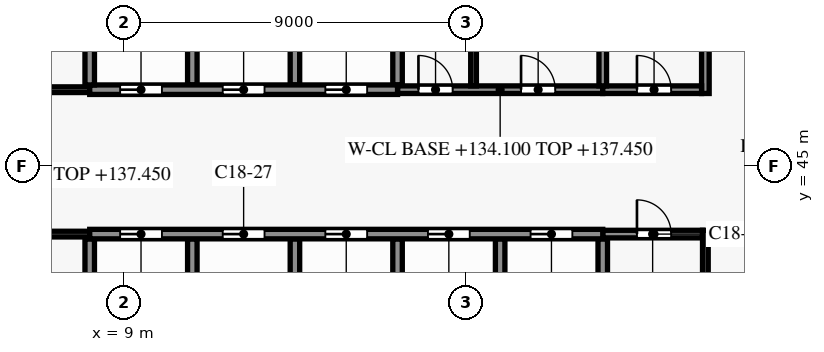
"""IFC4 building model, lengths in metres.
Left out: names, types, materials, properties, quantities, classifications, styles, units other than length and angle.
Written with IfcOpenShell. Run it as: python <this file> out.ifc"""

import sys

from ifc_helpers import new_model, si_unit, direction, frame, frame_2d, origin, place, context, subcontext, project, spatial, rectangle, extrude, element, fill, save


model = new_model("IFC4")
c1 = context("Model", 3, precision=1e-05, world=origin(), true_north=direction((0.0, 1.0)))
c2 = subcontext(c1, "Body", "Model", "MODEL_VIEW")
j1 = project(units=[si_unit("LENGTHUNIT", "METRE"), si_unit("PLANEANGLEUNIT", "RADIAN")], contexts=[c1])
p1 = place(None, origin())
s1 = spatial("IfcSite", under=j1, at=p1, CompositionType="ELEMENT")
p2 = place(p1, origin())
s2 = spatial("IfcBuilding", under=s1, at=p2, CompositionType="ELEMENT")
p3 = place(p2, frame((0.0, 0.0, 134.1)))
s3 = spatial("IfcBuildingStorey", under=s2, at=p3, CompositionType="ELEMENT", Elevation=134.1)
p4 = place(p3, frame((21.6, 43.2, 0.0), z_axis=(0.0, 0.0, 1.0), x_axis=(1.0, 0.0, 0.0)))
e1 = element("IfcWall", 1, at=p4, inside=s3, PredefinedType="PARTITIONING", context=c2, shape_type="SweptSolid", body=[
    extrude(rectangle(XDim=2.625, YDim=0.2, at=frame_2d((1.312, 0.0))), origin(), (0.0, 0.0, 1.0), 3.35),
])
p5 = place(p4, frame((0.9, 0.0, 0.0)))
e2 = element("IfcOpeningElement", 2, at=p5, cuts=e1, PredefinedType="OPENING", context=c2, shape_type="SweptSolid", body=[
    extrude(rectangle(XDim=0.9, YDim=2.1, at=frame_2d((0.45, 1.05))), frame((0.0, 0.11, 0.0), z_axis=(0.0, -1.0, 0.0), x_axis=(1.0, 0.0, 0.0)), (0.0, 0.0, 1.0), 0.22),
])
p6 = place(p3, frame((0.15, 43.2, 0.0), z_axis=(0.0, 0.0, 1.0), x_axis=(1.0, 0.0, 0.0)))
e3 = element("IfcWall", 3, at=p6, inside=s3, PredefinedType="PARTITIONING", context=c2, shape_type="SweptSolid", body=[
    extrude(rectangle(XDim=7.95, YDim=0.15, at=frame_2d((3.975, 0.0))), origin(), (0.0, 0.0, 1.0), 3.35),
])
p7 = place(p6, frame((0.725, 0.0, 0.0)))
e4 = element("IfcOpeningElement", 4, at=p7, cuts=e3, PredefinedType="OPENING", context=c2, shape_type="SweptSolid", body=[
    extrude(rectangle(XDim=0.9, YDim=2.1, at=frame_2d((0.45, 1.05))), frame((0.0, 0.085, 0.0), z_axis=(0.0, -1.0, 0.0), x_axis=(1.0, 0.0, 0.0)), (0.0, 0.0, 1.0), 0.17),
])
p8 = place(p6, frame((4.45, 0.0, 0.0)))
e5 = element("IfcOpeningElement", 5, at=p8, cuts=e3, PredefinedType="OPENING", context=c2, shape_type="SweptSolid", body=[
    extrude(rectangle(XDim=0.9, YDim=2.1, at=frame_2d((0.45, 1.05))), frame((0.0, 0.085, 0.0), z_axis=(0.0, -1.0, 0.0), x_axis=(1.0, 0.0, 0.0)), (0.0, 0.0, 1.0), 0.17),
])
p9 = place(p3, frame((8.1, 43.2, 0.0), z_axis=(0.0, 0.0, 1.0), x_axis=(1.0, 0.0, 0.0)))
e6 = element("IfcWall", 6, at=p9, inside=s3, PredefinedType="SHEAR", context=c2, shape_type="SweptSolid", body=[
    extrude(rectangle(XDim=13.5, YDim=0.25, at=frame_2d((6.75, 0.0))), origin(), (0.0, 0.0, 1.0), 3.5),
])
p10 = place(p9, frame((0.8, 0.0, 0.0)))
e7 = element("IfcOpeningElement", 7, at=p10, cuts=e6, PredefinedType="OPENING", context=c2, shape_type="SweptSolid", body=[
    extrude(rectangle(XDim=1.1, YDim=2.1, at=frame_2d((0.55, 1.05))), frame((0.0, 0.135, 0.0), z_axis=(0.0, -1.0, 0.0), x_axis=(1.0, 0.0, 0.0)), (0.0, 0.0, 1.0), 0.27),
])
p11 = place(p9, frame((3.5, 0.0, 0.0)))
e8 = element("IfcOpeningElement", 8, at=p11, cuts=e6, PredefinedType="OPENING", context=c2, shape_type="SweptSolid", body=[
    extrude(rectangle(XDim=1.1, YDim=2.1, at=frame_2d((0.55, 1.05))), frame((0.0, 0.135, 0.0), z_axis=(0.0, -1.0, 0.0), x_axis=(1.0, 0.0, 0.0)), (0.0, 0.0, 1.0), 0.27),
])
p12 = place(p9, frame((6.2, 0.0, 0.0)))
e9 = element("IfcOpeningElement", 9, at=p12, cuts=e6, PredefinedType="OPENING", context=c2, shape_type="SweptSolid", body=[
    extrude(rectangle(XDim=1.1, YDim=2.1, at=frame_2d((0.55, 1.05))), frame((0.0, 0.135, 0.0), z_axis=(0.0, -1.0, 0.0), x_axis=(1.0, 0.0, 0.0)), (0.0, 0.0, 1.0), 0.27),
])
p13 = place(p9, frame((8.9, 0.0, 0.0)))
e10 = element("IfcOpeningElement", 10, at=p13, cuts=e6, PredefinedType="OPENING", context=c2, shape_type="SweptSolid", body=[
    extrude(rectangle(XDim=1.1, YDim=2.1, at=frame_2d((0.55, 1.05))), frame((0.0, 0.135, 0.0), z_axis=(0.0, -1.0, 0.0), x_axis=(1.0, 0.0, 0.0)), (0.0, 0.0, 1.0), 0.27),
])
p14 = place(p9, frame((11.6, 0.0, 0.0)))
e11 = element("IfcOpeningElement", 11, at=p14, cuts=e6, PredefinedType="OPENING", context=c2, shape_type="SweptSolid", body=[
    extrude(rectangle(XDim=1.1, YDim=2.1, at=frame_2d((0.55, 1.05))), frame((0.0, 0.135, 0.0), z_axis=(0.0, -1.0, 0.0), x_axis=(1.0, 0.0, 0.0)), (0.0, 0.0, 1.0), 0.27),
])
p15 = place(p3, frame((16.2, 47.0, 0.0), z_axis=(0.0, 0.0, 1.0), x_axis=(1.0, 0.0, 0.0)))
e12 = element("IfcWall", 12, at=p15, inside=s3, PredefinedType="PARTITIONING", context=c2, shape_type="SweptSolid", body=[
    extrude(rectangle(XDim=5.4, YDim=0.2, at=frame_2d((2.7, 0.0))), origin(), (0.0, 0.0, 1.0), 3.35),
])
p16 = place(p15, frame((0.55, 0.0, 0.0)))
e13 = element("IfcOpeningElement", 13, at=p16, cuts=e12, PredefinedType="OPENING", context=c2, shape_type="SweptSolid", body=[
    extrude(rectangle(XDim=0.9, YDim=2.1, at=frame_2d((0.45, 1.05))), frame((0.0, 0.11, 0.0), z_axis=(0.0, -1.0, 0.0), x_axis=(1.0, 0.0, 0.0)), (0.0, 0.0, 1.0), 0.22),
])
p17 = place(p15, frame((3.25, 0.0, 0.0)))
e14 = element("IfcOpeningElement", 14, at=p17, cuts=e12, PredefinedType="OPENING", context=c2, shape_type="SweptSolid", body=[
    extrude(rectangle(XDim=0.9, YDim=2.1, at=frame_2d((0.45, 1.05))), frame((0.0, 0.11, 0.0), z_axis=(0.0, -1.0, 0.0), x_axis=(1.0, 0.0, 0.0)), (0.0, 0.0, 1.0), 0.22),
])
p18 = place(p3, frame((0.15, 47.0, 0.0), z_axis=(0.0, 0.0, 1.0), x_axis=(1.0, 0.0, 0.0)))
e15 = element("IfcWall", 15, at=p18, inside=s3, PredefinedType="PARTITIONING", context=c2, shape_type="SweptSolid", body=[
    extrude(rectangle(XDim=7.95, YDim=0.15, at=frame_2d((3.975, 0.0))), origin(), (0.0, 0.0, 1.0), 3.35),
])
p19 = place(p18, frame((0.725, 0.0, 0.0)))
e16 = element("IfcOpeningElement", 16, at=p19, cuts=e15, PredefinedType="OPENING", context=c2, shape_type="SweptSolid", body=[
    extrude(rectangle(XDim=0.9, YDim=2.1, at=frame_2d((0.45, 1.05))), frame((0.0, 0.085, 0.0), z_axis=(0.0, -1.0, 0.0), x_axis=(1.0, 0.0, 0.0)), (0.0, 0.0, 1.0), 0.17),
])
p20 = place(p18, frame((4.45, 0.0, 0.0)))
e17 = element("IfcOpeningElement", 17, at=p20, cuts=e15, PredefinedType="OPENING", context=c2, shape_type="SweptSolid", body=[
    extrude(rectangle(XDim=0.9, YDim=2.1, at=frame_2d((0.45, 1.05))), frame((0.0, 0.085, 0.0), z_axis=(0.0, -1.0, 0.0), x_axis=(1.0, 0.0, 0.0)), (0.0, 0.0, 1.0), 0.17),
])
p21 = place(p3, frame((21.6, 47.0, 0.0), z_axis=(0.0, 0.0, 1.0), x_axis=(1.0, 0.0, 0.0)))
e18 = element("IfcWall", 18, at=p21, inside=s3, PredefinedType="PARTITIONING", context=c2, shape_type="SweptSolid", body=[
    extrude(rectangle(XDim=2.6, YDim=0.2, at=frame_2d((1.3, 0.0))), origin(), (0.0, 0.0, 1.0), 3.35),
])
p22 = place(p21, frame((0.9, 0.0, 0.0)))
e19 = element("IfcOpeningElement", 19, at=p22, cuts=e18, PredefinedType="OPENING", context=c2, shape_type="SweptSolid", body=[
    extrude(rectangle(XDim=0.9, YDim=2.1, at=frame_2d((0.45, 1.05))), frame((0.0, 0.11, 0.0), z_axis=(0.0, -1.0, 0.0), x_axis=(1.0, 0.0, 0.0)), (0.0, 0.0, 1.0), 0.22),
])
p23 = place(p3, frame((8.1, 47.0, 0.0), z_axis=(0.0, 0.0, 1.0), x_axis=(1.0, 0.0, 0.0)))
e20 = element("IfcWall", 20, at=p23, inside=s3, PredefinedType="SHEAR", context=c2, shape_type="SweptSolid", body=[
    extrude(rectangle(XDim=8.1, YDim=0.25, at=frame_2d((4.05, 0.0))), origin(), (0.0, 0.0, 1.0), 3.5),
])
p24 = place(p23, frame((0.8, 0.0, 0.0)))
e21 = element("IfcOpeningElement", 21, at=p24, cuts=e20, PredefinedType="OPENING", context=c2, shape_type="SweptSolid", body=[
    extrude(rectangle(XDim=1.1, YDim=2.1, at=frame_2d((0.55, 1.05))), frame((0.0, 0.135, 0.0), z_axis=(0.0, -1.0, 0.0), x_axis=(1.0, 0.0, 0.0)), (0.0, 0.0, 1.0), 0.27),
])
p25 = place(p23, frame((3.5, 0.0, 0.0)))
e22 = element("IfcOpeningElement", 22, at=p25, cuts=e20, PredefinedType="OPENING", context=c2, shape_type="SweptSolid", body=[
    extrude(rectangle(XDim=1.1, YDim=2.1, at=frame_2d((0.55, 1.05))), frame((0.0, 0.135, 0.0), z_axis=(0.0, -1.0, 0.0), x_axis=(1.0, 0.0, 0.0)), (0.0, 0.0, 1.0), 0.27),
])
p26 = place(p23, frame((6.2, 0.0, 0.0)))
e23 = element("IfcOpeningElement", 23, at=p26, cuts=e20, PredefinedType="OPENING", context=c2, shape_type="SweptSolid", body=[
    extrude(rectangle(XDim=1.1, YDim=2.1, at=frame_2d((0.55, 1.05))), frame((0.0, 0.135, 0.0), z_axis=(0.0, -1.0, 0.0), x_axis=(1.0, 0.0, 0.0)), (0.0, 0.0, 1.0), 0.27),
])
for number, where, z_axis, x_axis in (
    (24, (8.1, 40.125, 0.0), (0.0, 0.0, 1.0), (0.0, 1.0, 0.0)),
    (25, (8.1, 47.125, 0.0), (0.0, 0.0, 1.0), (0.0, 1.0, 0.0)),
    (26, (10.8, 40.125, 0.0), (0.0, 0.0, 1.0), (0.0, 1.0, 0.0)),
    (27, (10.8, 47.125, 0.0), (0.0, 0.0, 1.0), (0.0, 1.0, 0.0)),
    (28, (13.5, 40.125, 0.0), (0.0, 0.0, 1.0), (0.0, 1.0, 0.0)),
    (29, (13.5, 47.125, 0.0), (0.0, 0.0, 1.0), (0.0, 1.0, 0.0)),
    (30, (16.2, 40.125, 0.0), (0.0, 0.0, 1.0), (0.0, 1.0, 0.0)),
):
    element("IfcWall", number, at=place(p3, frame(where, z_axis=z_axis, x_axis=x_axis)), inside=s3, PredefinedType="SHEAR", context=c2, shape_type="SweptSolid", body=[
        extrude(rectangle(XDim=2.95, YDim=0.25, at=frame_2d((1.475, 0.0))), origin(), (0.0, 0.0, 1.0), 3.5),
    ])
p27 = place(p3, frame((16.2, 47.125, 0.0), z_axis=(0.0, 0.0, 1.0), x_axis=(0.0, 1.0, 0.0)))
e31 = element("IfcWall", 31, at=p27, inside=s3, PredefinedType="SHEAR", context=c2, shape_type="SweptSolid", body=[
    extrude(rectangle(XDim=3.075, YDim=0.25, at=frame_2d((1.538, 0.0))), origin(), (0.0, 0.0, 1.0), 3.5),
])
p28 = place(p3, frame((18.2, 47.1, 0.0), z_axis=(0.0, 0.0, 1.0), x_axis=(0.0, 1.0, 0.0)))
e32 = element("IfcWall", 32, at=p28, inside=s3, PredefinedType="PARTITIONING", context=c2, shape_type="SweptSolid", body=[
    extrude(rectangle(XDim=4.625, YDim=0.15, at=frame_2d((2.312, 0.0))), origin(), (0.0, 0.0, 1.0), 3.35),
])
p29 = place(p3, frame((18.9, 40.125, 0.0), z_axis=(0.0, 0.0, 1.0), x_axis=(0.0, 1.0, 0.0)))
e33 = element("IfcWall", 33, at=p29, inside=s3, PredefinedType="SHEAR", context=c2, shape_type="SweptSolid", body=[
    extrude(rectangle(XDim=2.95, YDim=0.25, at=frame_2d((1.475, 0.0))), origin(), (0.0, 0.0, 1.0), 3.5),
])
p30 = place(p3, frame((21.6, 47.1, 0.0), z_axis=(0.0, 0.0, 1.0), x_axis=(0.0, 1.0, 0.0)))
e34 = element("IfcWall", 34, at=p30, inside=s3, PredefinedType="PARTITIONING", context=c2, shape_type="SweptSolid", body=[
    extrude(rectangle(XDim=4.6, YDim=0.2, at=frame_2d((2.3, 0.0))), origin(), (0.0, 0.0, 1.0), 3.35),
])
p31 = place(p3, frame((21.6, 40.125, 0.0), z_axis=(0.0, 0.0, 1.0), x_axis=(0.0, 1.0, 0.0)))
e35 = element("IfcWall", 35, at=p31, inside=s3, PredefinedType="SHEAR", context=c2, shape_type="SweptSolid", body=[
    extrude(rectangle(XDim=2.95, YDim=0.25, at=frame_2d((1.475, 0.0))), origin(), (0.0, 0.0, 1.0), 3.5),
])
p32 = place(p3, frame((24.3, 35.925, 0.0), z_axis=(0.0, 0.0, 1.0), x_axis=(0.0, 1.0, 0.0)))
e36 = element("IfcWall", 36, at=p32, inside=s3, PredefinedType="PARTITIONING", context=c2, shape_type="SweptSolid", body=[
    extrude(rectangle(XDim=7.375, YDim=0.15, at=frame_2d((3.688, 0.0))), origin(), (0.0, 0.0, 1.0), 3.35),
])
p33 = place(p3, frame((24.3, 46.9, 0.0), z_axis=(0.0, 0.0, 1.0), x_axis=(0.0, 1.0, 0.0)))
e37 = element("IfcWall", 37, at=p33, inside=s3, PredefinedType="SHEAR", context=c2, shape_type="SweptSolid", body=[
    extrude(rectangle(XDim=5.0, YDim=0.2, at=frame_2d((2.5, 0.0))), origin(), (0.0, 0.0, 1.0), 3.5),
])
p34 = place(p22, origin())
e38 = element("IfcDoor", 38, at=p34, inside=s3, OperationType="SINGLE_SWING_LEFT", PredefinedType="DOOR", context=c2, shape_type="SweptSolid", body=[
    extrude(rectangle(XDim=0.9, YDim=2.1, at=frame_2d((0.45, 1.05))), frame((0.0, 0.025, 0.0), z_axis=(0.0, -1.0, 0.0), x_axis=(1.0, 0.0, 0.0)), (0.0, 0.0, 1.0), 0.05),
])
fill(e19, e38)
p35 = place(p16, origin())
e39 = element("IfcDoor", 39, at=p35, inside=s3, OperationType="SINGLE_SWING_LEFT", PredefinedType="DOOR", context=c2, shape_type="SweptSolid", body=[
    extrude(rectangle(XDim=0.9, YDim=2.1, at=frame_2d((0.45, 1.05))), frame((0.0, 0.025, 0.0), z_axis=(0.0, -1.0, 0.0), x_axis=(1.0, 0.0, 0.0)), (0.0, 0.0, 1.0), 0.05),
])
fill(e13, e39)
p36 = place(p17, origin())
e40 = element("IfcDoor", 40, at=p36, inside=s3, OperationType="SINGLE_SWING_RIGHT", PredefinedType="DOOR", context=c2, shape_type="SweptSolid", body=[
    extrude(rectangle(XDim=0.9, YDim=2.1, at=frame_2d((0.45, 1.05))), frame((0.0, 0.025, 0.0), z_axis=(0.0, -1.0, 0.0), x_axis=(1.0, 0.0, 0.0)), (0.0, 0.0, 1.0), 0.05),
])
fill(e14, e40)
p37 = place(p5, origin())
e41 = element("IfcDoor", 41, at=p37, inside=s3, OperationType="SINGLE_SWING_RIGHT", PredefinedType="DOOR", context=c2, shape_type="SweptSolid", body=[
    extrude(rectangle(XDim=0.9, YDim=2.1, at=frame_2d((0.45, 1.05))), frame((0.0, 0.025, 0.0), z_axis=(0.0, -1.0, 0.0), x_axis=(1.0, 0.0, 0.0)), (0.0, 0.0, 1.0), 0.05),
])
fill(e2, e41)
p38 = place(p10, origin())
e42 = element("IfcDoor", 42, at=p38, inside=s3, OperationType="DOUBLE_DOOR_SLIDING", PredefinedType="DOOR", context=c2, shape_type="SweptSolid", body=[
    extrude(rectangle(XDim=1.1, YDim=2.1, at=frame_2d((0.55, 1.05))), frame((0.0, 0.025, 0.0), z_axis=(0.0, -1.0, 0.0), x_axis=(1.0, 0.0, 0.0)), (0.0, 0.0, 1.0), 0.05),
])
fill(e7, e42)
p39 = place(p11, origin())
e43 = element("IfcDoor", 43, at=p39, inside=s3, OperationType="DOUBLE_DOOR_SLIDING", PredefinedType="DOOR", context=c2, shape_type="SweptSolid", body=[
    extrude(rectangle(XDim=1.1, YDim=2.1, at=frame_2d((0.55, 1.05))), frame((0.0, 0.025, 0.0), z_axis=(0.0, -1.0, 0.0), x_axis=(1.0, 0.0, 0.0)), (0.0, 0.0, 1.0), 0.05),
])
fill(e8, e43)
p40 = place(p12, origin())
e44 = element("IfcDoor", 44, at=p40, inside=s3, OperationType="DOUBLE_DOOR_SLIDING", PredefinedType="DOOR", context=c2, shape_type="SweptSolid", body=[
    extrude(rectangle(XDim=1.1, YDim=2.1, at=frame_2d((0.55, 1.05))), frame((0.0, 0.025, 0.0), z_axis=(0.0, -1.0, 0.0), x_axis=(1.0, 0.0, 0.0)), (0.0, 0.0, 1.0), 0.05),
])
fill(e9, e44)
p41 = place(p24, origin())
e45 = element("IfcDoor", 45, at=p41, inside=s3, OperationType="DOUBLE_DOOR_SLIDING", PredefinedType="DOOR", context=c2, shape_type="SweptSolid", body=[
    extrude(rectangle(XDim=1.1, YDim=2.1, at=frame_2d((0.55, 1.05))), frame((0.0, 0.025, 0.0), z_axis=(0.0, -1.0, 0.0), x_axis=(1.0, 0.0, 0.0)), (0.0, 0.0, 1.0), 0.05),
])
fill(e21, e45)
p42 = place(p25, origin())
e46 = element("IfcDoor", 46, at=p42, inside=s3, OperationType="DOUBLE_DOOR_SLIDING", PredefinedType="DOOR", context=c2, shape_type="SweptSolid", body=[
    extrude(rectangle(XDim=1.1, YDim=2.1, at=frame_2d((0.55, 1.05))), frame((0.0, 0.025, 0.0), z_axis=(0.0, -1.0, 0.0), x_axis=(1.0, 0.0, 0.0)), (0.0, 0.0, 1.0), 0.05),
])
fill(e22, e46)
p43 = place(p26, origin())
e47 = element("IfcDoor", 47, at=p43, inside=s3, OperationType="DOUBLE_DOOR_SLIDING", PredefinedType="DOOR", context=c2, shape_type="SweptSolid", body=[
    extrude(rectangle(XDim=1.1, YDim=2.1, at=frame_2d((0.55, 1.05))), frame((0.0, 0.025, 0.0), z_axis=(0.0, -1.0, 0.0), x_axis=(1.0, 0.0, 0.0)), (0.0, 0.0, 1.0), 0.05),
])
fill(e23, e47)
p44 = place(p13, origin())
e48 = element("IfcDoor", 48, at=p44, inside=s3, OperationType="DOUBLE_DOOR_SLIDING", PredefinedType="DOOR", context=c2, shape_type="SweptSolid", body=[
    extrude(rectangle(XDim=1.1, YDim=2.1, at=frame_2d((0.55, 1.05))), frame((0.0, 0.025, 0.0), z_axis=(0.0, -1.0, 0.0), x_axis=(1.0, 0.0, 0.0)), (0.0, 0.0, 1.0), 0.05),
])
fill(e10, e48)
p45 = place(p14, origin())
e49 = element("IfcDoor", 49, at=p45, inside=s3, OperationType="DOUBLE_DOOR_SLIDING", PredefinedType="DOOR", context=c2, shape_type="SweptSolid", body=[
    extrude(rectangle(XDim=1.1, YDim=2.1, at=frame_2d((0.55, 1.05))), frame((0.0, 0.025, 0.0), z_axis=(0.0, -1.0, 0.0), x_axis=(1.0, 0.0, 0.0)), (0.0, 0.0, 1.0), 0.05),
])
fill(e11, e49)
save(model, sys.argv[1])
